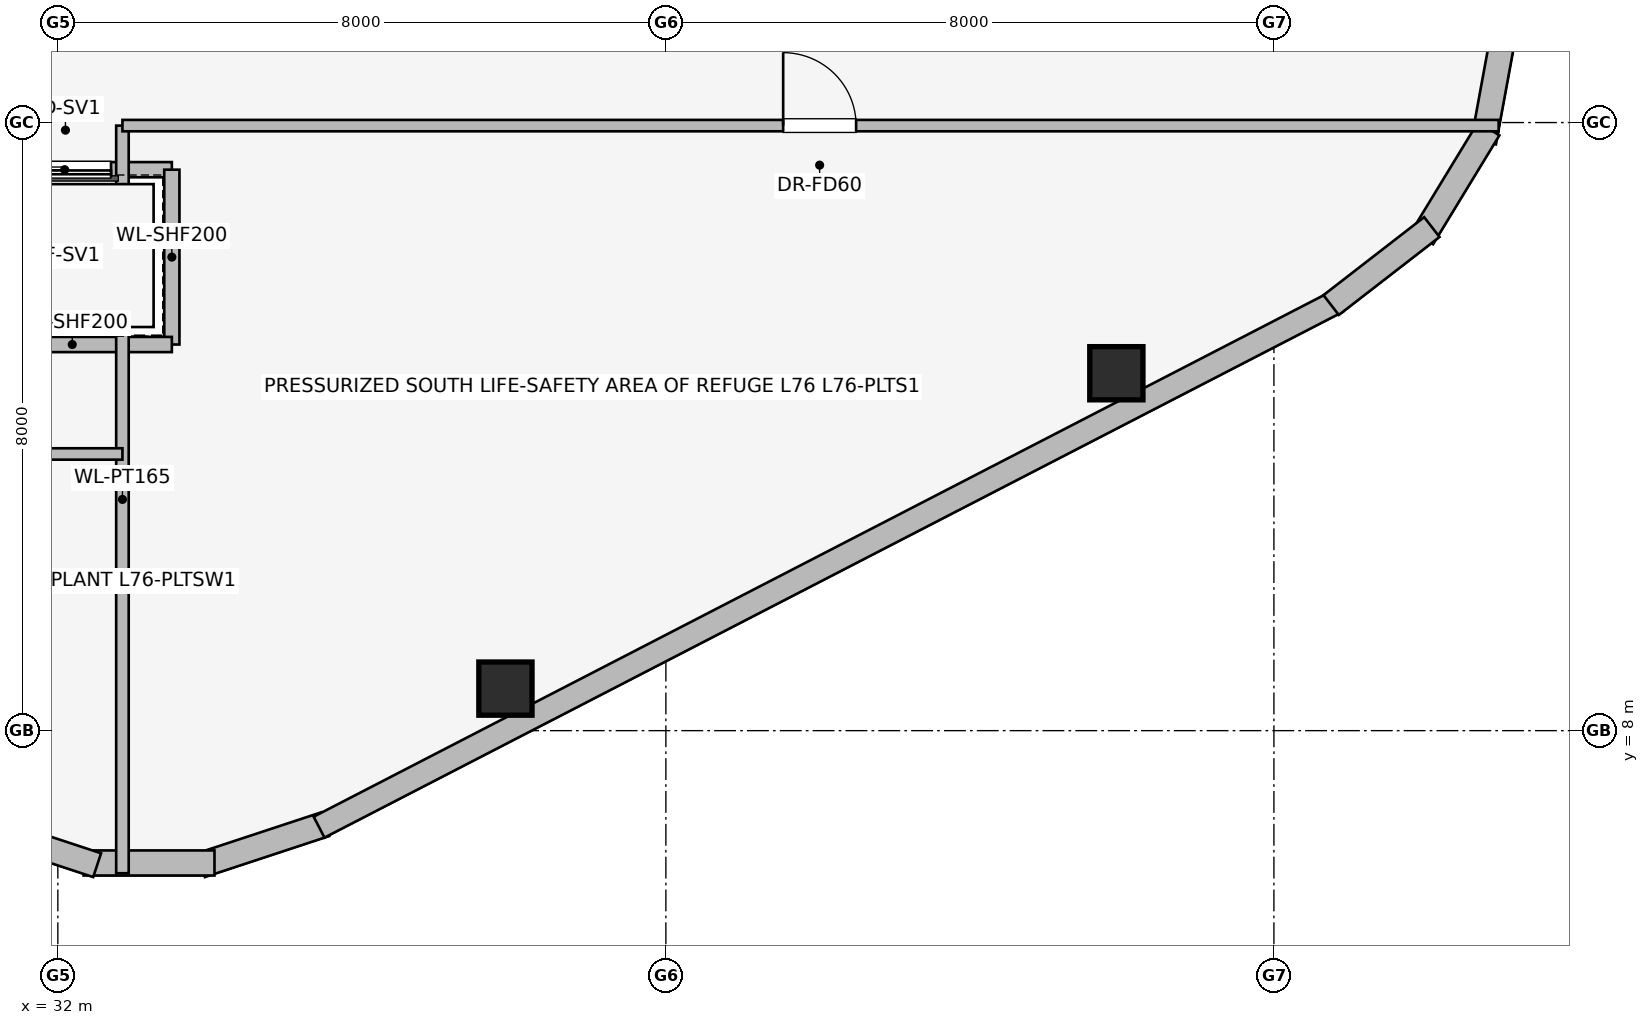
"""IFC4 building model, lengths in metres.
Left out: names, types, materials, properties, quantities, classifications, styles, units other than length and angle.
Written with IfcOpenShell. Run it as: python <this file> out.ifc"""

import sys

from ifc_helpers import new_model, si_unit, direction, frame, frame_2d, origin, origin_2d, place, context, subcontext, project, spatial, rectangle, extrude, element, fill, save


model = new_model("IFC4")
c1 = context("Model", 3, precision=1e-05, world=origin(), true_north=direction((0.0, 1.0)))
c2 = subcontext(c1, "Body", "Model", "MODEL_VIEW")
j1 = project(units=[si_unit("LENGTHUNIT", "METRE"), si_unit("PLANEANGLEUNIT", "RADIAN")], contexts=[c1])
p1 = place(None, origin())
s1 = spatial("IfcSite", under=j1, at=p1, CompositionType="ELEMENT")
p2 = place(p1, origin())
s2 = spatial("IfcBuilding", under=s1, at=p2, CompositionType="ELEMENT")
p3 = place(p2, frame((0.0, 0.0, 279.9)))
s3 = spatial("IfcBuildingStorey", under=s2, at=p3, CompositionType="ELEMENT", Elevation=279.9)
for number, where, z_axis, x_axis in (
    (1, (37.889, 8.553, 0.0), (0.0, 0.0, 1.0), (1.0, 0.0, 0.0)),
    (2, (45.927, 12.702, 0.0), (0.0, 0.0, 1.0), (1.0, 0.0, 0.0)),
):
    element("IfcColumn", number, at=place(p3, frame(where, z_axis=z_axis, x_axis=x_axis)), inside=s3, PredefinedType="COLUMN", context=c2, shape_type="SweptSolid", body=[
        extrude(rectangle(XDim=0.7, YDim=0.7, at=origin_2d()), origin(), (0.0, 0.0, 1.0), 5.2),
    ])
p4 = place(p3, frame((35.518, 6.769, 0.0), z_axis=(0.0, 0.0, 1.0), x_axis=(-0.949713440491, -0.313120393699, 0.0)))
e3 = element("IfcWall", 3, at=p4, inside=s3, PredefinedType="STANDARD", context=c2, shape_type="SweptSolid", body=[
    extrude(rectangle(XDim=1.722, YDim=0.33, at=frame_2d((0.861, 0.0))), origin(), (0.0, 0.0, 1.0), 4.89),
])
p5 = place(p3, frame((34.061, 6.259, 0.0), z_axis=(0.0, 0.0, 1.0), x_axis=(-1.0, 0.0, 0.0)))
e4 = element("IfcWall", 4, at=p5, inside=s3, PredefinedType="STANDARD", context=c2, shape_type="SweptSolid", body=[
    extrude(rectangle(XDim=1.722, YDim=0.33, at=frame_2d((0.861, 0.0))), origin(), (0.0, 0.0, 1.0), 4.89),
])
p6 = place(p3, frame((32.517, 6.23, 0.0), z_axis=(0.0, 0.0, 1.0), x_axis=(-0.949713440491, 0.313120393699, 0.0)))
e5 = element("IfcWall", 5, at=p6, inside=s3, PredefinedType="STANDARD", context=c2, shape_type="SweptSolid", body=[
    extrude(rectangle(XDim=1.722, YDim=0.33, at=frame_2d((0.861, 0.0))), origin(), (0.0, 0.0, 1.0), 4.89),
])
p7 = place(p3, frame((48.834, 13.646, 0.0), z_axis=(0.0, 0.0, 1.0), x_axis=(-0.888581481622, -0.458718814218, 0.0)))
e6 = element("IfcWall", 6, at=p7, inside=s3, PredefinedType="STANDARD", context=c2, shape_type="SweptSolid", body=[
    extrude(rectangle(XDim=15.077, YDim=0.31, at=frame_2d((7.539, 0.0))), origin(), (0.0, 0.0, 1.0), 4.89),
])
p8 = place(p3, frame((51.062, 17.392, 0.0), z_axis=(0.0, 0.0, 1.0), x_axis=(-0.180691763044, -0.983539773862, 0.0)))
e7 = element("IfcWall", 7, at=p8, inside=s3, PredefinedType="STANDARD", context=c2, shape_type="SweptSolid", body=[
    extrude(rectangle(XDim=1.677, YDim=0.33, at=frame_2d((0.838, 0.0))), origin(), (0.0, 0.0, 1.0), 4.89),
])
p9 = place(p3, frame((50.826, 15.918, 0.0), z_axis=(0.0, 0.0, 1.0), x_axis=(-0.520325409202, -0.853968072318, 0.0)))
e8 = element("IfcWall", 8, at=p9, inside=s3, PredefinedType="STANDARD", context=c2, shape_type="SweptSolid", body=[
    extrude(rectangle(XDim=1.678, YDim=0.33, at=frame_2d((0.839, 0.0))), origin(), (0.0, 0.0, 1.0), 4.89),
])
p10 = place(p3, frame((50.078, 14.625, 0.0), z_axis=(0.0, 0.0, 1.0), x_axis=(-0.790691856293, -0.61221433207, 0.0)))
e9 = element("IfcWall", 9, at=p10, inside=s3, PredefinedType="STANDARD", context=c2, shape_type="SweptSolid", body=[
    extrude(rectangle(XDim=1.676, YDim=0.33, at=frame_2d((0.838, 0.0))), origin(), (0.0, 0.0, 1.0), 4.89),
])
p11 = place(p3, frame((33.5, 15.38, 0.0), z_axis=(0.0, 0.0, 1.0), x_axis=(-1.0, 0.0, 0.0)))
e10 = element("IfcWall", 10, at=p11, inside=s3, PredefinedType="PARTITIONING", context=c2, shape_type="SweptSolid", body=[
    extrude(rectangle(XDim=2.82, YDim=0.2, at=frame_2d((1.41, 0.0))), origin(), (0.0, 0.0, 1.0), 4.89),
])
p12 = place(p11, frame((0.8, 0.0, 0.0)))
e11 = element("IfcOpeningElement", 11, at=p12, cuts=e10, PredefinedType="OPENING", context=c2, shape_type="SweptSolid", body=[
    extrude(rectangle(XDim=1.2, YDim=2.2, at=frame_2d((0.6, 1.1))), frame((0.0, 0.11, 0.0), z_axis=(0.0, -1.0, 0.0), x_axis=(1.0, 0.0, 0.0)), (0.0, 0.0, 1.0), 0.22),
])
p13 = place(p3, frame((33.5, 13.08, 0.0), z_axis=(0.0, 0.0, 1.0), x_axis=(0.0, 1.0, 0.0)))
e12 = element("IfcWall", 12, at=p13, inside=s3, PredefinedType="PARTITIONING", context=c2, shape_type="SweptSolid", body=[
    extrude(rectangle(XDim=2.3, YDim=0.2, at=frame_2d((1.15, 0.0))), origin(), (0.0, 0.0, 1.0), 4.89),
])
p14 = place(p3, frame((30.879, 13.08, 0.0), z_axis=(0.0, 0.0, 1.0), x_axis=(1.0, 0.0, 0.0)))
e13 = element("IfcWall", 13, at=p14, inside=s3, PredefinedType="PARTITIONING", context=c2, shape_type="SweptSolid", body=[
    extrude(rectangle(XDim=2.621, YDim=0.2, at=frame_2d((1.311, 0.0))), origin(), (0.0, 0.0, 1.0), 4.89),
])
p15 = place(p3, frame((32.85, 6.124, 0.0), z_axis=(0.0, 0.0, 1.0), x_axis=(0.0, 1.0, 0.0)))
e14 = element("IfcWall", 14, at=p15, inside=s3, PredefinedType="PARTITIONING", context=c2, shape_type="SweptSolid", body=[
    extrude(rectangle(XDim=9.836, YDim=0.165, at=frame_2d((4.918, 0.0))), origin(), (0.0, 0.0, 1.0), 4.89),
])
p16 = place(p3, frame((32.85, 11.64, 0.0), z_axis=(0.0, 0.0, 1.0), x_axis=(-1.0, 0.0, 0.0)))
e15 = element("IfcWall", 15, at=p16, inside=s3, PredefinedType="PARTITIONING", context=c2, shape_type="SweptSolid", body=[
    extrude(rectangle(XDim=11.715, YDim=0.15, at=frame_2d((5.857, 0.0))), origin(), (0.0, 0.0, 1.0), 4.89),
])
p17 = place(p16, frame((5.421, 0.0, 0.0)))
e16 = element("IfcOpeningElement", 16, at=p17, cuts=e15, PredefinedType="OPENING", context=c2, shape_type="SweptSolid", body=[
    extrude(rectangle(XDim=0.96, YDim=2.0, at=frame_2d((0.48, 1.0))), frame((0.0, 0.085, 0.0), z_axis=(0.0, -1.0, 0.0), x_axis=(1.0, 0.0, 0.0)), (0.0, 0.0, 1.0), 0.17),
])
p18 = place(p3, frame((32.85, 15.96, 0.0), z_axis=(0.0, 0.0, 1.0), x_axis=(1.0, 0.0, 0.0)))
e17 = element("IfcWall", 17, at=p18, inside=s3, PredefinedType="PARTITIONING", context=c2, shape_type="SweptSolid", body=[
    extrude(rectangle(XDim=18.107, YDim=0.15, at=frame_2d((9.053, 0.0))), origin(), (0.0, 0.0, 1.0), 4.433),
])
p19 = place(p18, frame((8.693, 0.0, 0.0)))
e18 = element("IfcOpeningElement", 18, at=p19, cuts=e17, PredefinedType="OPENING", context=c2, shape_type="SweptSolid", body=[
    extrude(rectangle(XDim=0.96, YDim=2.0, at=frame_2d((0.48, 1.0))), frame((0.0, 0.085, 0.0), z_axis=(0.0, -1.0, 0.0), x_axis=(1.0, 0.0, 0.0)), (0.0, 0.0, 1.0), 0.17),
])
p20 = place(p12, origin())
e19 = element("IfcDoor", 19, at=p20, inside=s3, OperationType="SLIDING_TO_RIGHT", PredefinedType="DOOR", context=c2, shape_type="SweptSolid", body=[
    extrude(rectangle(XDim=1.2, YDim=2.2, at=frame_2d((0.6, 1.1))), frame((0.0, 0.025, 0.0), z_axis=(0.0, -1.0, 0.0), x_axis=(1.0, 0.0, 0.0)), (0.0, 0.0, 1.0), 0.05),
])
fill(e11, e19)
p21 = place(p19, origin())
e20 = element("IfcDoor", 20, at=p21, inside=s3, OperationType="SINGLE_SWING_LEFT", PredefinedType="DOOR", context=c2, shape_type="SweptSolid", body=[
    extrude(rectangle(XDim=0.96, YDim=2.0, at=frame_2d((0.48, 1.0))), frame((0.0, 0.025, 0.0), z_axis=(0.0, -1.0, 0.0), x_axis=(1.0, 0.0, 0.0)), (0.0, 0.0, 1.0), 0.05),
])
fill(e18, e20)
save(model, sys.argv[1])
